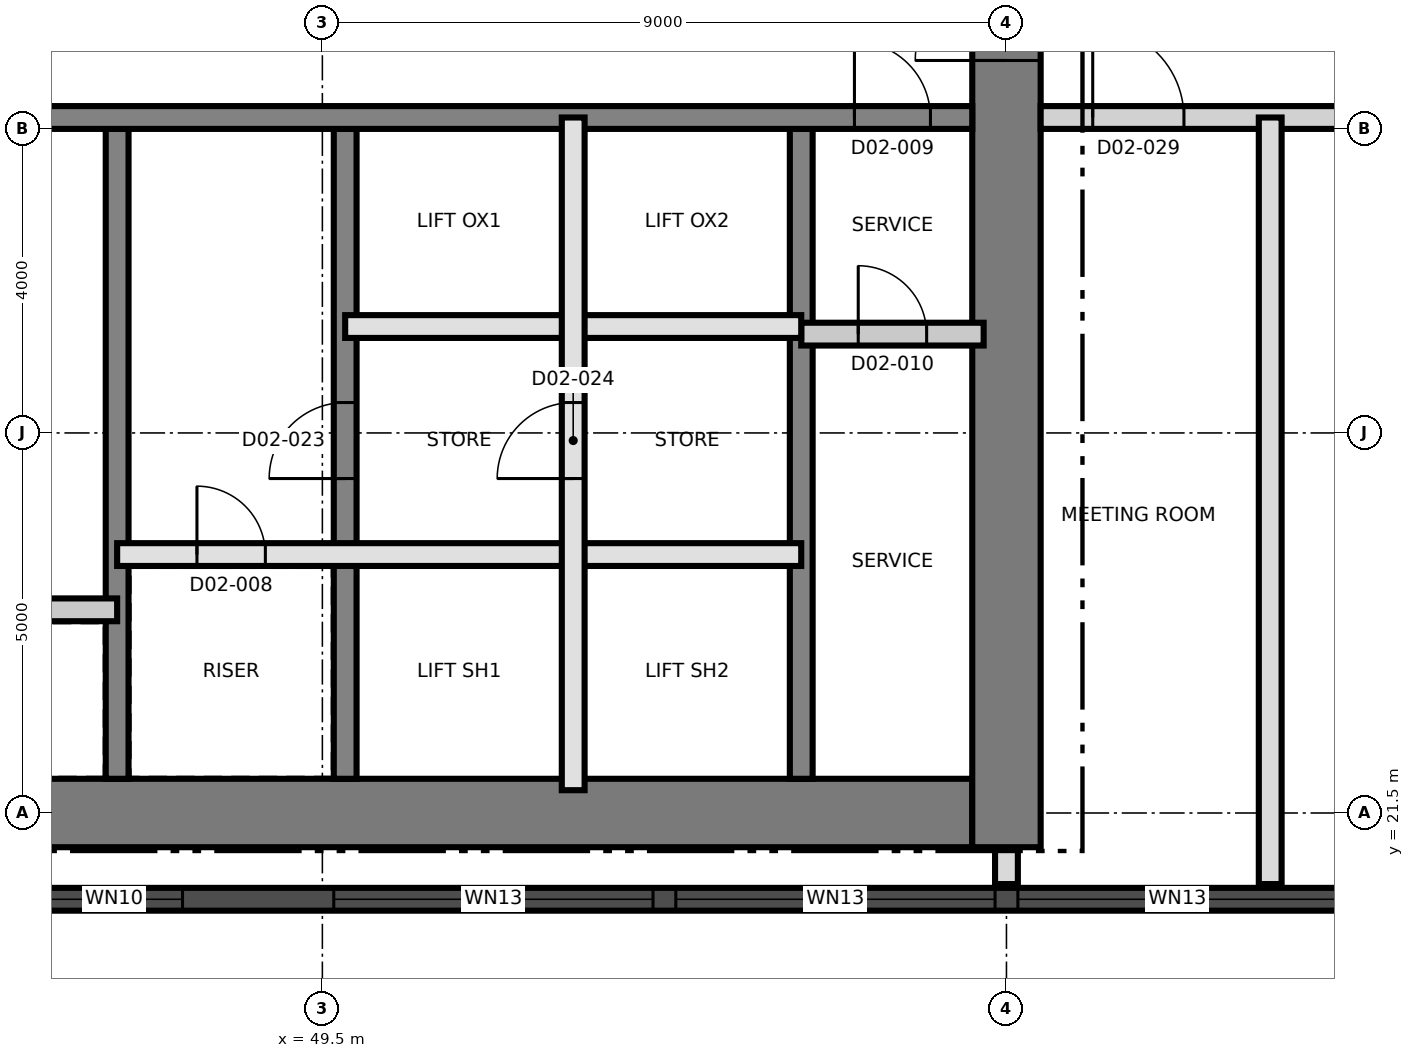
"""IFC4 building model, lengths in metres.
Left out: names, types, materials, properties, quantities, classifications, styles, units other than length and angle.
Written with IfcOpenShell. Run it as: python <this file> out.ifc"""

import sys

from ifc_helpers import new_model, si_unit, direction, frame, frame_2d, origin, place, context, subcontext, project, spatial, rectangle, extrude, element, fill, save


model = new_model("IFC4")
c1 = context("Model", 3, precision=1e-05, world=origin(), true_north=direction((0.0, 1.0)))
c2 = subcontext(c1, "Body", "Model", "MODEL_VIEW")
j1 = project(units=[si_unit("LENGTHUNIT", "METRE"), si_unit("PLANEANGLEUNIT", "RADIAN")], contexts=[c1])
p1 = place(None, origin())
s1 = spatial("IfcSite", under=j1, at=p1, CompositionType="ELEMENT")
p2 = place(p1, origin())
s2 = spatial("IfcBuilding", under=s1, at=p2, CompositionType="ELEMENT")
p3 = place(p2, frame((0.0, 0.0, 48.3)))
s3 = spatial("IfcBuildingStorey", under=s2, at=p3, CompositionType="ELEMENT", Elevation=48.3)
p4 = place(p3, frame((31.05, 21.5, 0.0), z_axis=(0.0, 0.0, 1.0), x_axis=(1.0, 0.0, 0.0)))
e1 = element("IfcWall", 1, at=p4, inside=s3, PredefinedType="SHEAR", context=c2, shape_type="SweptSolid", body=[
    extrude(rectangle(XDim=27.0, YDim=0.9, at=frame_2d((13.5, 0.0))), origin(), (0.0, 0.0, 1.0), 3.7),
])
p5 = place(p3, frame((58.5, 21.05, 0.0), z_axis=(0.0, 0.0, 1.0), x_axis=(0.0, 1.0, 0.0)))
e2 = element("IfcWall", 2, at=p5, inside=s3, PredefinedType="SHEAR", context=c2, shape_type="SweptSolid", body=[
    extrude(rectangle(XDim=18.9, YDim=0.9, at=frame_2d((9.45, 0.0))), origin(), (0.0, 0.0, 1.0), 3.7),
])
p6 = place(p5, frame((10.35, 0.0, 0.0)))
e3 = element("IfcOpeningElement", 3, at=p6, cuts=e2, PredefinedType="OPENING", context=c2, shape_type="SweptSolid", body=[
    extrude(rectangle(XDim=1.2, YDim=2.1, at=frame_2d((0.6, 1.05))), frame((0.0, 0.46, 0.0), z_axis=(0.0, -1.0, 0.0), x_axis=(1.0, 0.0, 0.0)), (0.0, 0.0, 1.0), 0.92),
])
p7 = place(p3, frame((46.8, 21.95, 0.0), z_axis=(0.0, 0.0, 1.0), x_axis=(0.0, 1.0, 0.0)))
e4 = element("IfcWall", 4, at=p7, inside=s3, PredefinedType="SHEAR", context=c2, shape_type="SweptSolid", body=[
    extrude(rectangle(XDim=8.55, YDim=0.3, at=frame_2d((4.275, 0.0))), origin(), (0.0, 0.0, 1.0), 3.7),
])
p8 = place(p3, frame((49.8, 21.95, 0.0), z_axis=(0.0, 0.0, 1.0), x_axis=(0.0, 1.0, 0.0)))
e5 = element("IfcWall", 5, at=p8, inside=s3, PredefinedType="SHEAR", context=c2, shape_type="SweptSolid", body=[
    extrude(rectangle(XDim=8.55, YDim=0.3, at=frame_2d((4.275, 0.0))), origin(), (0.0, 0.0, 1.0), 3.7),
])
p9 = place(p8, frame((3.95, 0.0, 0.0)))
e6 = element("IfcOpeningElement", 6, at=p9, cuts=e5, PredefinedType="OPENING", context=c2, shape_type="SweptSolid", body=[
    extrude(rectangle(XDim=1.0, YDim=2.1, at=frame_2d((0.5, 1.05))), frame((0.0, 0.16, 0.0), z_axis=(0.0, -1.0, 0.0), x_axis=(1.0, 0.0, 0.0)), (0.0, 0.0, 1.0), 0.32),
])
p10 = place(p3, frame((55.8, 21.95, 0.0), z_axis=(0.0, 0.0, 1.0), x_axis=(0.0, 1.0, 0.0)))
e7 = element("IfcWall", 7, at=p10, inside=s3, PredefinedType="SHEAR", context=c2, shape_type="SweptSolid", body=[
    extrude(rectangle(XDim=8.55, YDim=0.3, at=frame_2d((4.275, 0.0))), origin(), (0.0, 0.0, 1.0), 3.7),
])
p11 = place(p3, frame((31.95, 30.65, 0.0), z_axis=(0.0, 0.0, 1.0), x_axis=(1.0, 0.0, 0.0)))
e8 = element("IfcWall", 8, at=p11, inside=s3, PredefinedType="SHEAR", context=c2, shape_type="SweptSolid", body=[
    extrude(rectangle(XDim=26.1, YDim=0.3, at=frame_2d((13.05, 0.0))), origin(), (0.0, 0.0, 1.0), 3.7),
])
p12 = place(p11, frame((24.55, 0.0, 0.0)))
e9 = element("IfcOpeningElement", 9, at=p12, cuts=e8, PredefinedType="OPENING", context=c2, shape_type="SweptSolid", body=[
    extrude(rectangle(XDim=1.0, YDim=2.1, at=frame_2d((0.5, 1.05))), frame((0.0, 0.16, 0.0), z_axis=(0.0, -1.0, 0.0), x_axis=(1.0, 0.0, 0.0)), (0.0, 0.0, 1.0), 0.32),
])
p13 = place(p11, frame((11.35, 0.0, 0.0)))
e10 = element("IfcOpeningElement", 10, at=p13, cuts=e8, PredefinedType="OPENING", context=c2, shape_type="SweptSolid", body=[
    extrude(rectangle(XDim=1.0, YDim=2.1, at=frame_2d((0.5, 1.05))), frame((0.0, 0.16, 0.0), z_axis=(0.0, -1.0, 0.0), x_axis=(1.0, 0.0, 0.0)), (0.0, 0.0, 1.0), 0.32),
])
p14 = place(p3, frame((44.021, 20.365, 0.0), z_axis=(0.0, 0.0, 1.0), x_axis=(1.0, 0.0, 0.0)))
e11 = element("IfcWall", 11, at=p14, inside=s3, PredefinedType="SOLIDWALL", context=c2, shape_type="SweptSolid", body=[
    extrude(rectangle(XDim=43.466, YDim=0.3, at=frame_2d((21.733, 0.0))), origin(), (0.0, 0.0, 1.0), 3.4),
])
p15 = place(p14, frame((1.84, 0.0, 0.3)))
e12 = element("IfcOpeningElement", 12, at=p15, cuts=e11, PredefinedType="OPENING", context=c2, shape_type="SweptSolid", body=[
    extrude(rectangle(XDim=1.8, YDim=2.4, at=frame_2d((0.9, 1.2))), frame((0.0, 0.16, 0.0), z_axis=(0.0, -1.0, 0.0), x_axis=(1.0, 0.0, 0.0)), (0.0, 0.0, 1.0), 0.32),
])
p16 = place(p14, frame((5.63, 0.0, 0.9)))
e13 = element("IfcOpeningElement", 13, at=p16, cuts=e11, PredefinedType="OPENING", context=c2, shape_type="SweptSolid", body=[
    extrude(rectangle(XDim=4.2, YDim=1.7, at=frame_2d((2.1, 0.85))), frame((0.0, 0.16, 0.0), z_axis=(0.0, -1.0, 0.0), x_axis=(1.0, 0.0, 0.0)), (0.0, 0.0, 1.0), 0.32),
])
p17 = place(p14, frame((10.13, 0.0, 0.9)))
e14 = element("IfcOpeningElement", 14, at=p17, cuts=e11, PredefinedType="OPENING", context=c2, shape_type="SweptSolid", body=[
    extrude(rectangle(XDim=4.2, YDim=1.7, at=frame_2d((2.1, 0.85))), frame((0.0, 0.16, 0.0), z_axis=(0.0, -1.0, 0.0), x_axis=(1.0, 0.0, 0.0)), (0.0, 0.0, 1.0), 0.32),
])
p18 = place(p14, frame((14.63, 0.0, 0.9)))
e15 = element("IfcOpeningElement", 15, at=p18, cuts=e11, PredefinedType="OPENING", context=c2, shape_type="SweptSolid", body=[
    extrude(rectangle(XDim=4.2, YDim=1.7, at=frame_2d((2.1, 0.85))), frame((0.0, 0.16, 0.0), z_axis=(0.0, -1.0, 0.0), x_axis=(1.0, 0.0, 0.0)), (0.0, 0.0, 1.0), 0.32),
])
p19 = place(p14, frame((19.13, 0.0, 0.9)))
e16 = element("IfcOpeningElement", 16, at=p19, cuts=e11, PredefinedType="OPENING", context=c2, shape_type="SweptSolid", body=[
    extrude(rectangle(XDim=4.2, YDim=1.7, at=frame_2d((2.1, 0.85))), frame((0.0, 0.16, 0.0), z_axis=(0.0, -1.0, 0.0), x_axis=(1.0, 0.0, 0.0)), (0.0, 0.0, 1.0), 0.32),
])
p20 = place(p14, frame((23.63, 0.0, 0.9)))
e17 = element("IfcOpeningElement", 17, at=p20, cuts=e11, PredefinedType="OPENING", context=c2, shape_type="SweptSolid", body=[
    extrude(rectangle(XDim=4.2, YDim=1.7, at=frame_2d((2.1, 0.85))), frame((0.0, 0.16, 0.0), z_axis=(0.0, -1.0, 0.0), x_axis=(1.0, 0.0, 0.0)), (0.0, 0.0, 1.0), 0.32),
])
p21 = place(p14, frame((28.13, 0.0, 0.9)))
e18 = element("IfcOpeningElement", 18, at=p21, cuts=e11, PredefinedType="OPENING", context=c2, shape_type="SweptSolid", body=[
    extrude(rectangle(XDim=4.2, YDim=1.7, at=frame_2d((2.1, 0.85))), frame((0.0, 0.16, 0.0), z_axis=(0.0, -1.0, 0.0), x_axis=(1.0, 0.0, 0.0)), (0.0, 0.0, 1.0), 0.32),
])
p22 = place(p14, frame((32.63, 0.0, 0.9)))
e19 = element("IfcOpeningElement", 19, at=p22, cuts=e11, PredefinedType="OPENING", context=c2, shape_type="SweptSolid", body=[
    extrude(rectangle(XDim=4.2, YDim=1.7, at=frame_2d((2.1, 0.85))), frame((0.0, 0.16, 0.0), z_axis=(0.0, -1.0, 0.0), x_axis=(1.0, 0.0, 0.0)), (0.0, 0.0, 1.0), 0.32),
])
p23 = place(p14, frame((37.13, 0.0, 0.9)))
e20 = element("IfcOpeningElement", 20, at=p23, cuts=e11, PredefinedType="OPENING", context=c2, shape_type="SweptSolid", body=[
    extrude(rectangle(XDim=4.2, YDim=1.7, at=frame_2d((2.1, 0.85))), frame((0.0, 0.16, 0.0), z_axis=(0.0, -1.0, 0.0), x_axis=(1.0, 0.0, 0.0)), (0.0, 0.0, 1.0), 0.32),
])
p24 = place(p3, frame((40.8, 24.173, 0.0), z_axis=(0.0, 0.0, 1.0), x_axis=(1.0, 0.0, 0.0)))
e21 = element("IfcWall", 21, at=p24, inside=s3, PredefinedType="PARTITIONING", context=c2, shape_type="SweptSolid", body=[
    extrude(rectangle(XDim=6.0, YDim=0.3, at=frame_2d((3.0, 0.0))), origin(), (0.0, 0.0, 1.0), 3.4),
])
p25 = place(p24, frame((2.5, 0.0, 0.0)))
e22 = element("IfcOpeningElement", 22, at=p25, cuts=e21, PredefinedType="OPENING", context=c2, shape_type="SweptSolid", body=[
    extrude(rectangle(XDim=1.0, YDim=2.1, at=frame_2d((0.5, 1.05))), frame((0.0, 0.16, 0.0), z_axis=(0.0, -1.0, 0.0), x_axis=(1.0, 0.0, 0.0)), (0.0, 0.0, 1.0), 0.32),
])
p26 = place(p3, frame((46.8, 24.9, 0.0), z_axis=(0.0, 0.0, 1.0), x_axis=(1.0, 0.0, 0.0)))
e23 = element("IfcWall", 23, at=p26, inside=s3, PredefinedType="SOLIDWALL", context=c2, shape_type="SweptSolid", body=[
    extrude(rectangle(XDim=9.0, YDim=0.3, at=frame_2d((4.5, 0.0))), origin(), (0.0, 0.0, 1.0), 3.4),
])
p27 = place(p26, frame((1.05, 0.0, 0.0)))
e24 = element("IfcOpeningElement", 24, at=p27, cuts=e23, PredefinedType="OPENING", context=c2, shape_type="SweptSolid", body=[
    extrude(rectangle(XDim=0.9, YDim=2.1, at=frame_2d((0.45, 1.05))), frame((0.0, 0.16, 0.0), z_axis=(0.0, -1.0, 0.0), x_axis=(1.0, 0.0, 0.0)), (0.0, 0.0, 1.0), 0.32),
])
p28 = place(p3, frame((55.8, 27.8, 0.0), z_axis=(0.0, 0.0, 1.0), x_axis=(1.0, 0.0, 0.0)))
e25 = element("IfcWall", 25, at=p28, inside=s3, PredefinedType="PARTITIONING", context=c2, shape_type="SweptSolid", body=[
    extrude(rectangle(XDim=2.4, YDim=0.3, at=frame_2d((1.2, 0.0))), origin(), (0.0, 0.0, 1.0), 3.4),
])
p29 = place(p28, frame((0.75, 0.0, 0.0)))
e26 = element("IfcOpeningElement", 26, at=p29, cuts=e25, PredefinedType="OPENING", context=c2, shape_type="SweptSolid", body=[
    extrude(rectangle(XDim=0.9, YDim=2.1, at=frame_2d((0.45, 1.05))), frame((0.0, 0.16, 0.0), z_axis=(0.0, -1.0, 0.0), x_axis=(1.0, 0.0, 0.0)), (0.0, 0.0, 1.0), 0.32),
])
p30 = place(p3, frame((49.8, 27.9, 0.0), z_axis=(0.0, 0.0, 1.0), x_axis=(1.0, 0.0, 0.0)))
e27 = element("IfcWall", 27, at=p30, inside=s3, PredefinedType="SOLIDWALL", context=c2, shape_type="SweptSolid", body=[
    extrude(rectangle(XDim=6.0, YDim=0.3, at=frame_2d((3.0, 0.0))), origin(), (0.0, 0.0, 1.0), 3.4),
])
p31 = place(p3, frame((52.8, 21.8, 0.0), z_axis=(0.0, 0.0, 1.0), x_axis=(0.0, 1.0, 0.0)))
e28 = element("IfcWall", 28, at=p31, inside=s3, PredefinedType="SOLIDWALL", context=c2, shape_type="SweptSolid", body=[
    extrude(rectangle(XDim=8.85, YDim=0.3, at=frame_2d((4.425, 0.0))), origin(), (0.0, 0.0, 1.0), 3.4),
])
p32 = place(p31, frame((4.1, 0.0, 0.0)))
e29 = element("IfcOpeningElement", 29, at=p32, cuts=e28, PredefinedType="OPENING", context=c2, shape_type="SweptSolid", body=[
    extrude(rectangle(XDim=1.0, YDim=2.1, at=frame_2d((0.5, 1.05))), frame((0.0, 0.16, 0.0), z_axis=(0.0, -1.0, 0.0), x_axis=(1.0, 0.0, 0.0)), (0.0, 0.0, 1.0), 0.32),
])
p33 = place(p3, frame((58.95, 30.65, 0.0), z_axis=(0.0, 0.0, 1.0), x_axis=(1.0, 0.0, 0.0)))
e30 = element("IfcWall", 30, at=p33, inside=s3, PredefinedType="PARTITIONING", context=c2, shape_type="SweptSolid", body=[
    extrude(rectangle(XDim=26.38, YDim=0.3, at=frame_2d((13.19, 0.0))), origin(), (0.0, 0.0, 1.0), 3.4),
])
p34 = place(p33, frame((0.685, 0.0, 0.0)))
e31 = element("IfcOpeningElement", 31, at=p34, cuts=e30, PredefinedType="OPENING", context=c2, shape_type="SweptSolid", body=[
    extrude(rectangle(XDim=1.2, YDim=2.1, at=frame_2d((0.6, 1.05))), frame((0.0, 0.16, 0.0), z_axis=(0.0, -1.0, 0.0), x_axis=(1.0, 0.0, 0.0)), (0.0, 0.0, 1.0), 0.32),
])
p35 = place(p33, frame((3.935, 0.0, 0.0)))
e32 = element("IfcOpeningElement", 32, at=p35, cuts=e30, PredefinedType="OPENING", context=c2, shape_type="SweptSolid", body=[
    extrude(rectangle(XDim=1.0, YDim=2.1, at=frame_2d((0.5, 1.05))), frame((0.0, 0.16, 0.0), z_axis=(0.0, -1.0, 0.0), x_axis=(1.0, 0.0, 0.0)), (0.0, 0.0, 1.0), 0.32),
])
p36 = place(p33, frame((12.55, 0.0, 0.0)))
e33 = element("IfcOpeningElement", 33, at=p36, cuts=e30, PredefinedType="OPENING", context=c2, shape_type="SweptSolid", body=[
    extrude(rectangle(XDim=1.0, YDim=2.4, at=frame_2d((0.5, 1.2))), frame((0.0, 0.16, 0.0), z_axis=(0.0, -1.0, 0.0), x_axis=(1.0, 0.0, 0.0)), (0.0, 0.0, 1.0), 0.32),
])
p37 = place(p33, frame((20.98, 0.0, 0.0)))
e34 = element("IfcOpeningElement", 34, at=p37, cuts=e30, PredefinedType="OPENING", context=c2, shape_type="SweptSolid", body=[
    extrude(rectangle(XDim=1.0, YDim=2.4, at=frame_2d((0.5, 1.2))), frame((0.0, 0.16, 0.0), z_axis=(0.0, -1.0, 0.0), x_axis=(1.0, 0.0, 0.0)), (0.0, 0.0, 1.0), 0.32),
])
p38 = place(p33, frame((22.63, 0.0, 0.0)))
e35 = element("IfcOpeningElement", 35, at=p38, cuts=e30, PredefinedType="OPENING", context=c2, shape_type="SweptSolid", body=[
    extrude(rectangle(XDim=1.0, YDim=2.4, at=frame_2d((0.5, 1.2))), frame((0.0, 0.16, 0.0), z_axis=(0.0, -1.0, 0.0), x_axis=(1.0, 0.0, 0.0)), (0.0, 0.0, 1.0), 0.32),
])
p39 = place(p3, frame((58.5, 20.565, 0.0), z_axis=(0.0, 0.0, 1.0), x_axis=(0.0, 1.0, 0.0)))
e36 = element("IfcWall", 36, at=p39, inside=s3, PredefinedType="PARTITIONING", context=c2, shape_type="SweptSolid", body=[
    extrude(rectangle(XDim=0.465, YDim=0.3, at=frame_2d((0.232, 0.0))), origin(), (0.0, 0.0, 1.0), 3.4),
])
p40 = place(p3, frame((61.97, 20.565, 0.0), z_axis=(0.0, 0.0, 1.0), x_axis=(0.0, 1.0, 0.0)))
e37 = element("IfcWall", 37, at=p40, inside=s3, PredefinedType="PARTITIONING", context=c2, shape_type="SweptSolid", body=[
    extrude(rectangle(XDim=10.085, YDim=0.3, at=frame_2d((5.042, 0.0))), origin(), (0.0, 0.0, 1.0), 3.4),
])
p41 = place(p15, origin())
e38 = element("IfcWindow", 38, at=p41, inside=s3, PartitioningType="SINGLE_PANEL", PredefinedType="WINDOW", context=c2, shape_type="SweptSolid", body=[
    extrude(rectangle(XDim=1.8, YDim=2.4, at=frame_2d((0.9, 1.2))), frame((0.0, 0.03, 0.0), z_axis=(0.0, -1.0, 0.0), x_axis=(1.0, 0.0, 0.0)), (0.0, 0.0, 1.0), 0.06),
])
fill(e12, e38)
p42 = place(p16, origin())
e39 = element("IfcWindow", 39, at=p42, inside=s3, PartitioningType="SINGLE_PANEL", PredefinedType="WINDOW", context=c2, shape_type="SweptSolid", body=[
    extrude(rectangle(XDim=4.2, YDim=1.7, at=frame_2d((2.1, 0.85))), frame((0.0, 0.03, 0.0), z_axis=(0.0, -1.0, 0.0), x_axis=(1.0, 0.0, 0.0)), (0.0, 0.0, 1.0), 0.06),
])
fill(e13, e39)
p43 = place(p17, origin())
e40 = element("IfcWindow", 40, at=p43, inside=s3, PartitioningType="SINGLE_PANEL", PredefinedType="WINDOW", context=c2, shape_type="SweptSolid", body=[
    extrude(rectangle(XDim=4.2, YDim=1.7, at=frame_2d((2.1, 0.85))), frame((0.0, 0.03, 0.0), z_axis=(0.0, -1.0, 0.0), x_axis=(1.0, 0.0, 0.0)), (0.0, 0.0, 1.0), 0.06),
])
fill(e14, e40)
p44 = place(p18, origin())
e41 = element("IfcWindow", 41, at=p44, inside=s3, PartitioningType="SINGLE_PANEL", PredefinedType="WINDOW", context=c2, shape_type="SweptSolid", body=[
    extrude(rectangle(XDim=4.2, YDim=1.7, at=frame_2d((2.1, 0.85))), frame((0.0, 0.03, 0.0), z_axis=(0.0, -1.0, 0.0), x_axis=(1.0, 0.0, 0.0)), (0.0, 0.0, 1.0), 0.06),
])
fill(e15, e41)
p45 = place(p27, origin())
e42 = element("IfcDoor", 42, at=p45, inside=s3, OperationType="SINGLE_SWING_RIGHT", PredefinedType="DOOR", context=c2, shape_type="SweptSolid", body=[
    extrude(rectangle(XDim=0.9, YDim=2.1, at=frame_2d((0.45, 1.05))), frame((0.0, 0.025, 0.0), z_axis=(0.0, -1.0, 0.0), x_axis=(1.0, 0.0, 0.0)), (0.0, 0.0, 1.0), 0.05),
])
fill(e24, e42)
p46 = place(p12, origin())
e43 = element("IfcDoor", 43, at=p46, inside=s3, OperationType="SINGLE_SWING_LEFT", PredefinedType="DOOR", context=c2, shape_type="SweptSolid", body=[
    extrude(rectangle(XDim=1.0, YDim=2.1, at=frame_2d((0.5, 1.05))), frame((0.0, 0.025, 0.0), z_axis=(0.0, -1.0, 0.0), x_axis=(1.0, 0.0, 0.0)), (0.0, 0.0, 1.0), 0.05),
])
fill(e9, e43)
p47 = place(p29, origin())
e44 = element("IfcDoor", 44, at=p47, inside=s3, OperationType="SINGLE_SWING_RIGHT", PredefinedType="DOOR", context=c2, shape_type="SweptSolid", body=[
    extrude(rectangle(XDim=0.9, YDim=2.1, at=frame_2d((0.45, 1.05))), frame((0.0, 0.025, 0.0), z_axis=(0.0, -1.0, 0.0), x_axis=(1.0, 0.0, 0.0)), (0.0, 0.0, 1.0), 0.05),
])
fill(e26, e44)
p48 = place(p6, origin())
e45 = element("IfcDoor", 45, at=p48, inside=s3, OperationType="SINGLE_SWING_LEFT", PredefinedType="DOOR", context=c2, shape_type="SweptSolid", body=[
    extrude(rectangle(XDim=1.2, YDim=2.1, at=frame_2d((0.6, 1.05))), frame((0.0, 0.025, 0.0), z_axis=(0.0, -1.0, 0.0), x_axis=(1.0, 0.0, 0.0)), (0.0, 0.0, 1.0), 0.05),
])
fill(e3, e45)
p49 = place(p9, origin())
e46 = element("IfcDoor", 46, at=p49, inside=s3, OperationType="SINGLE_SWING_LEFT", PredefinedType="DOOR", context=c2, shape_type="SweptSolid", body=[
    extrude(rectangle(XDim=1.0, YDim=2.1, at=frame_2d((0.5, 1.05))), frame((0.0, 0.025, 0.0), z_axis=(0.0, -1.0, 0.0), x_axis=(1.0, 0.0, 0.0)), (0.0, 0.0, 1.0), 0.05),
])
fill(e6, e46)
p50 = place(p32, origin())
e47 = element("IfcDoor", 47, at=p50, inside=s3, OperationType="SINGLE_SWING_RIGHT", PredefinedType="DOOR", context=c2, shape_type="SweptSolid", body=[
    extrude(rectangle(XDim=1.0, YDim=2.1, at=frame_2d((0.5, 1.05))), frame((0.0, 0.025, 0.0), z_axis=(0.0, -1.0, 0.0), x_axis=(1.0, 0.0, 0.0)), (0.0, 0.0, 1.0), 0.05),
])
fill(e29, e47)
p51 = place(p34, origin())
e48 = element("IfcDoor", 48, at=p51, inside=s3, OperationType="SINGLE_SWING_LEFT", PredefinedType="DOOR", context=c2, shape_type="SweptSolid", body=[
    extrude(rectangle(XDim=1.2, YDim=2.1, at=frame_2d((0.6, 1.05))), frame((0.0, 0.025, 0.0), z_axis=(0.0, -1.0, 0.0), x_axis=(1.0, 0.0, 0.0)), (0.0, 0.0, 1.0), 0.05),
])
fill(e31, e48)
save(model, sys.argv[1])
